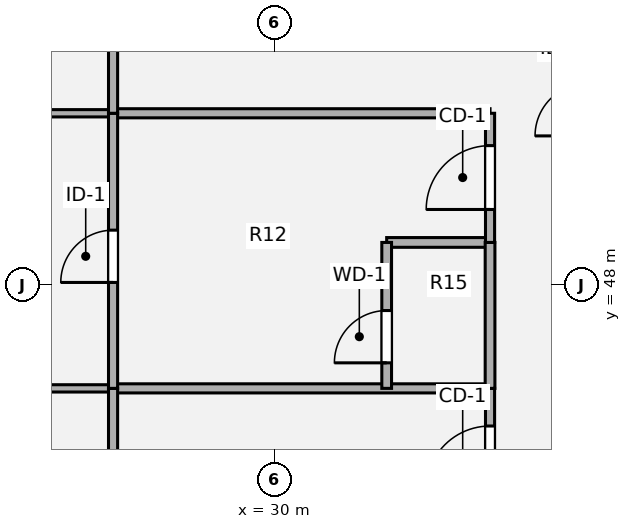
"""IFC4 building model, lengths in metres.
Left out: names, types, materials, properties, quantities, classifications, styles, units other than length and angle.
Written with IfcOpenShell. Run it as: python <this file> out.ifc"""

import sys

from ifc_helpers import new_model, si_unit, direction, frame, frame_2d, origin, origin_2d, place, context, subcontext, project, spatial, rectangle, extrude, source, transform, mapped, element, fill, save


model = new_model("IFC4")
c1 = context("Model", 3, precision=1e-05, world=origin(), true_north=direction((0.0, 1.0)))
c2 = subcontext(c1, "Body", "Model", "MODEL_VIEW")
j1 = project(units=[si_unit("LENGTHUNIT", "METRE"), si_unit("PLANEANGLEUNIT", "RADIAN")], contexts=[c1])
p1 = place(None, origin())
s1 = spatial("IfcSite", under=j1, at=p1, CompositionType="ELEMENT")
p2 = place(p1, origin())
s2 = spatial("IfcBuilding", under=s1, at=p2, CompositionType="ELEMENT")
p3 = place(p2, frame((0.0, 0.0, 260.82)))
s3 = spatial("IfcBuildingStorey", under=s2, at=p3, CompositionType="ELEMENT", Elevation=260.82)
p4 = place(p3, frame((17.78, 46.298, 0.0), z_axis=(0.0, 0.0, 1.0), x_axis=(1.0, 0.0, 0.0)))
e1 = element("IfcWall", 1, at=p4, inside=s3, PredefinedType="PARTITIONING", context=c2, shape_type="SweptSolid", body=[
    extrude(rectangle(XDim=9.57, YDim=0.12, at=frame_2d((4.785, 0.0))), origin(), (0.0, 0.0, 1.0), 3.055),
])
p5 = place(p3, frame((27.35, 46.298, 0.0), z_axis=(0.0, 0.0, 1.0), x_axis=(1.0, 0.0, 0.0)))
e2 = element("IfcWall", 2, at=p5, inside=s3, PredefinedType="PARTITIONING", context=c2, shape_type="SweptSolid", body=[
    extrude(rectangle(XDim=6.2, YDim=0.15, at=frame_2d((3.1, 0.0))), origin(), (0.0, 0.0, 1.0), 3.055),
])
p6 = place(p3, frame((31.85, 48.698, 0.0), z_axis=(0.0, 0.0, 1.0), x_axis=(1.0, 0.0, 0.0)))
e3 = element("IfcWall", 3, at=p6, inside=s3, PredefinedType="PLUMBINGWALL", context=c2, shape_type="SweptSolid", body=[
    extrude(rectangle(XDim=1.7, YDim=0.16, at=frame_2d((0.85, 0.0))), origin(), (0.0, 0.0, 1.0), 3.259),
])
p7 = place(p3, frame((17.78, 50.822, 0.0), z_axis=(0.0, 0.0, 1.0), x_axis=(1.0, 0.0, 0.0)))
e4 = element("IfcWall", 4, at=p7, inside=s3, PredefinedType="PARTITIONING", context=c2, shape_type="SweptSolid", body=[
    extrude(rectangle(XDim=9.57, YDim=0.12, at=frame_2d((4.785, 0.0))), origin(), (0.0, 0.0, 1.0), 2.982),
])
p8 = place(p3, frame((27.35, 50.822, 0.0), z_axis=(0.0, 0.0, 1.0), x_axis=(1.0, 0.0, 0.0)))
e5 = element("IfcWall", 5, at=p8, inside=s3, PredefinedType="PARTITIONING", context=c2, shape_type="SweptSolid", body=[
    extrude(rectangle(XDim=6.2, YDim=0.15, at=frame_2d((3.1, 0.0))), origin(), (0.0, 0.0, 1.0), 2.982),
])
p9 = place(p3, frame((27.35, 41.48, 0.0), z_axis=(0.0, 0.0, 1.0), x_axis=(0.0, 1.0, 0.0)))
e6 = element("IfcWall", 6, at=p9, inside=s3, PredefinedType="PARTITIONING", context=c2, shape_type="SweptSolid", body=[
    extrude(rectangle(XDim=4.818, YDim=0.15, at=frame_2d((2.409, 0.0))), origin(), (0.0, 0.0, 1.0), 3.5),
])
p10 = place(p9, frame((2.06, 0.0, 0.0)))
e7 = element("IfcOpeningElement", 7, at=p10, cuts=e6, PredefinedType="OPENING", context=c2, shape_type="SweptSolid", body=[
    extrude(rectangle(XDim=0.86, YDim=2.1, at=origin_2d()), frame((0.43, 0.085, 1.05), z_axis=(0.0, -1.0, 0.0), x_axis=(1.0, 0.0, 0.0)), (0.0, 0.0, 1.0), 0.17),
])
p11 = place(p3, frame((27.35, 46.298, 0.0), z_axis=(0.0, 0.0, 1.0), x_axis=(0.0, 1.0, 0.0)))
e8 = element("IfcWall", 8, at=p11, inside=s3, PredefinedType="PARTITIONING", context=c2, shape_type="SweptSolid", body=[
    extrude(rectangle(XDim=4.524, YDim=0.15, at=frame_2d((2.262, 0.0))), origin(), (0.0, 0.0, 1.0), 3.5),
])
p12 = place(p11, frame((1.742, 0.0, 0.0)))
e9 = element("IfcOpeningElement", 9, at=p12, cuts=e8, PredefinedType="OPENING", context=c2, shape_type="SweptSolid", body=[
    extrude(rectangle(XDim=0.86, YDim=2.1, at=origin_2d()), frame((0.43, 0.085, 1.05), z_axis=(0.0, -1.0, 0.0), x_axis=(1.0, 0.0, 0.0)), (0.0, 0.0, 1.0), 0.17),
])
p13 = place(p3, frame((27.35, 50.822, 0.0), z_axis=(0.0, 0.0, 1.0), x_axis=(0.0, 1.0, 0.0)))
e10 = element("IfcWall", 10, at=p13, inside=s3, PredefinedType="PARTITIONING", context=c2, shape_type="SweptSolid", body=[
    extrude(rectangle(XDim=4.176, YDim=0.15, at=frame_2d((2.088, 0.0))), origin(), (0.0, 0.0, 1.0), 3.5),
])
p14 = place(p13, frame((1.718, 0.0, 0.0)))
e11 = element("IfcOpeningElement", 11, at=p14, cuts=e10, PredefinedType="OPENING", context=c2, shape_type="SweptSolid", body=[
    extrude(rectangle(XDim=0.86, YDim=2.1, at=origin_2d()), frame((0.43, 0.085, 1.05), z_axis=(0.0, -1.0, 0.0), x_axis=(1.0, 0.0, 0.0)), (0.0, 0.0, 1.0), 0.17),
])
p15 = place(p3, frame((31.85, 46.298, 0.0), z_axis=(0.0, 0.0, 1.0), x_axis=(0.0, 1.0, 0.0)))
e12 = element("IfcWall", 12, at=p15, inside=s3, PredefinedType="PLUMBINGWALL", context=c2, shape_type="SweptSolid", body=[
    extrude(rectangle(XDim=2.4, YDim=0.16, at=frame_2d((1.2, 0.0))), origin(), (0.0, 0.0, 1.0), 3.5),
])
p16 = place(p15, frame((0.42, 0.0, 0.0)))
e13 = element("IfcOpeningElement", 13, at=p16, cuts=e12, PredefinedType="OPENING", context=c2, shape_type="SweptSolid", body=[
    extrude(rectangle(XDim=0.86, YDim=2.1, at=origin_2d()), frame((0.43, 0.09, 1.05), z_axis=(0.0, -1.0, 0.0), x_axis=(1.0, 0.0, 0.0)), (0.0, 0.0, 1.0), 0.18),
])
p17 = place(p3, frame((33.55, 44.0, 0.0), z_axis=(0.0, 0.0, 1.0), x_axis=(0.0, 1.0, 0.0)))
e14 = element("IfcWall", 14, at=p17, inside=s3, PredefinedType="PARTITIONING", context=c2, shape_type="SweptSolid", body=[
    extrude(rectangle(XDim=2.298, YDim=0.15, at=frame_2d((1.149, 0.0))), origin(), (0.0, 0.0, 1.0), 3.5),
])
p18 = place(p17, frame((0.629, 0.0, 0.0)))
e15 = element("IfcOpeningElement", 15, at=p18, cuts=e14, PredefinedType="OPENING", context=c2, shape_type="SweptSolid", body=[
    extrude(rectangle(XDim=1.05, YDim=2.1, at=origin_2d()), frame((0.525, 0.085, 1.05), z_axis=(0.0, -1.0, 0.0), x_axis=(1.0, 0.0, 0.0)), (0.0, 0.0, 1.0), 0.17),
])
p19 = place(p3, frame((33.55, 46.298, 0.0), z_axis=(0.0, 0.0, 1.0), x_axis=(0.0, 1.0, 0.0)))
e16 = element("IfcWall", 16, at=p19, inside=s3, PredefinedType="PLUMBINGWALL", context=c2, shape_type="SweptSolid", body=[
    extrude(rectangle(XDim=2.4, YDim=0.16, at=frame_2d((1.2, 0.0))), origin(), (0.0, 0.0, 1.0), 3.5),
])
p20 = place(p3, frame((33.55, 48.698, 0.0), z_axis=(0.0, 0.0, 1.0), x_axis=(0.0, 1.0, 0.0)))
e17 = element("IfcWall", 17, at=p20, inside=s3, PredefinedType="PARTITIONING", context=c2, shape_type="SweptSolid", body=[
    extrude(rectangle(XDim=2.124, YDim=0.15, at=frame_2d((1.062, 0.0))), origin(), (0.0, 0.0, 1.0), 3.5),
])
p21 = place(p20, frame((0.542, 0.0, 0.0)))
e18 = element("IfcOpeningElement", 18, at=p21, cuts=e17, PredefinedType="OPENING", context=c2, shape_type="SweptSolid", body=[
    extrude(rectangle(XDim=1.05, YDim=2.1, at=origin_2d()), frame((0.525, 0.085, 1.05), z_axis=(0.0, -1.0, 0.0), x_axis=(1.0, 0.0, 0.0)), (0.0, 0.0, 1.0), 0.17),
])
m1 = source(origin(), c2, "Body", "SweptSolid", [
    extrude(rectangle(XDim=0.86, YDim=2.1, at=origin_2d()), frame((0.43, 0.025, 1.05), z_axis=(0.0, -1.0, 0.0), x_axis=(1.0, 0.0, 0.0)), (0.0, 0.0, 1.0), 0.05),
])
p22 = place(p12, origin())
e19 = element("IfcDoor", 19, at=p22, inside=s3, OperationType="SINGLE_SWING_LEFT", PredefinedType="DOOR", context=c2, shape_type="MappedRepresentation", body=[
    mapped(m1, transform((0.0, 0.0, 0.0), x_axis=(1.0, 0.0, 0.0), y_axis=(0.0, 1.0, 0.0), z_axis=(0.0, 0.0, 1.0), scale=1.0)),
])
fill(e9, e19)
m2 = source(origin(), c2, "Body", "SweptSolid", [
    extrude(rectangle(XDim=0.86, YDim=2.1, at=origin_2d()), frame((0.43, 0.025, 1.05), z_axis=(0.0, -1.0, 0.0), x_axis=(1.0, 0.0, 0.0)), (0.0, 0.0, 1.0), 0.05),
])
p23 = place(p16, origin())
e20 = element("IfcDoor", 20, at=p23, inside=s3, OperationType="SINGLE_SWING_LEFT", PredefinedType="DOOR", context=c2, shape_type="MappedRepresentation", body=[
    mapped(m2, transform((0.0, 0.0, 0.0), x_axis=(1.0, 0.0, 0.0), y_axis=(0.0, 1.0, 0.0), z_axis=(0.0, 0.0, 1.0), scale=1.0)),
])
fill(e13, e20)
m3 = source(origin(), c2, "Body", "SweptSolid", [
    extrude(rectangle(XDim=1.05, YDim=2.1, at=origin_2d()), frame((0.525, 0.025, 1.05), z_axis=(0.0, -1.0, 0.0), x_axis=(1.0, 0.0, 0.0)), (0.0, 0.0, 1.0), 0.05),
])
p24 = place(p18, origin())
e21 = element("IfcDoor", 21, at=p24, inside=s3, OperationType="SINGLE_SWING_LEFT", PredefinedType="DOOR", context=c2, shape_type="MappedRepresentation", body=[
    mapped(m3, transform((0.0, 0.0, 0.0), x_axis=(1.0, 0.0, 0.0), y_axis=(0.0, 1.0, 0.0), z_axis=(0.0, 0.0, 1.0), scale=1.0)),
])
fill(e15, e21)
p25 = place(p21, origin())
e22 = element("IfcDoor", 22, at=p25, inside=s3, OperationType="SINGLE_SWING_LEFT", PredefinedType="DOOR", context=c2, shape_type="MappedRepresentation", body=[
    mapped(m3, transform((0.0, 0.0, 0.0), x_axis=(1.0, 0.0, 0.0), y_axis=(0.0, 1.0, 0.0), z_axis=(0.0, 0.0, 1.0), scale=1.0)),
])
fill(e18, e22)
save(model, sys.argv[1])
